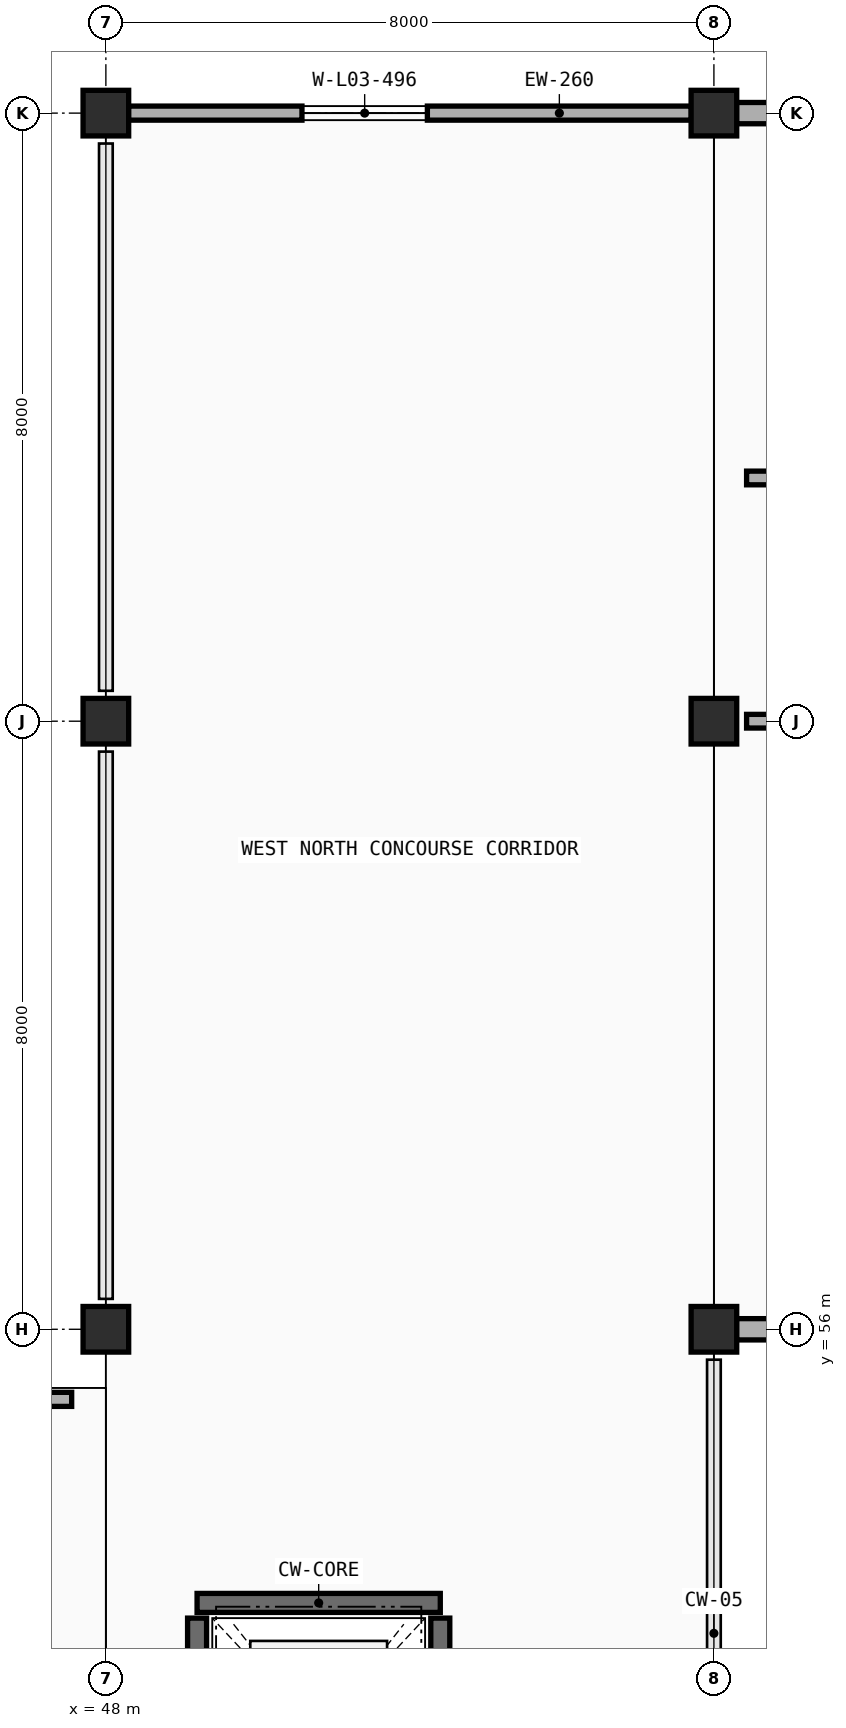
"""IFC4 building model, lengths in metres.
Left out: names, types, materials, properties, quantities, classifications, styles, units other than length and angle.
Written with IfcOpenShell. Run it as: python <this file> out.ifc"""

import sys

from ifc_helpers import new_model, si_unit, direction, frame, frame_2d, origin, origin_2d, place, context, subcontext, project, spatial, rectangle, extrude, element, fill, save


model = new_model("IFC4")
c1 = context("Model", 3, precision=1e-05, world=origin(), true_north=direction((0.0, 1.0)))
c2 = subcontext(c1, "Body", "Model", "MODEL_VIEW")
j1 = project(units=[si_unit("LENGTHUNIT", "METRE"), si_unit("PLANEANGLEUNIT", "RADIAN")], contexts=[c1])
p1 = place(None, origin())
s1 = spatial("IfcSite", under=j1, at=p1, CompositionType="ELEMENT")
p2 = place(p1, origin())
s2 = spatial("IfcBuilding", under=s1, at=p2, CompositionType="ELEMENT")
p3 = place(p2, frame((0.0, 0.0, 9.6)))
s3 = spatial("IfcBuildingStorey", under=s2, at=p3, CompositionType="ELEMENT", Elevation=9.6)
for number, where, z_axis, x_axis in (
    (1, (48.0, 56.0, 0.0), (0.0, 0.0, 1.0), (1.0, 0.0, 0.0)),
    (2, (56.0, 56.0, 0.0), (0.0, 0.0, 1.0), (1.0, 0.0, 0.0)),
    (3, (48.0, 64.0, 0.0), (0.0, 0.0, 1.0), (1.0, 0.0, 0.0)),
    (4, (56.0, 64.0, 0.0), (0.0, 0.0, 1.0), (1.0, 0.0, 0.0)),
    (5, (48.0, 72.0, 0.0), (0.0, 0.0, 1.0), (1.0, 0.0, 0.0)),
    (6, (56.0, 72.0, 0.0), (0.0, 0.0, 1.0), (1.0, 0.0, 0.0)),
):
    element("IfcColumn", number, at=place(p3, frame(where, z_axis=z_axis, x_axis=x_axis)), inside=s3, PredefinedType="COLUMN", context=c2, shape_type="SweptSolid", body=[
        extrude(rectangle(XDim=0.6, YDim=0.6, at=origin_2d()), origin(), (0.0, 0.0, 1.0), 4.2),
    ])
p4 = place(p3, frame((63.653, 56.0, 0.0), z_axis=(0.0, 0.0, 1.0), x_axis=(-1.0, 0.0, 0.0)))
e7 = element("IfcWall", 7, at=p4, inside=s3, PredefinedType="STANDARD", context=c2, shape_type="SweptSolid", body=[
    extrude(rectangle(XDim=7.356, YDim=0.28, at=frame_2d((3.678, 0.0))), origin(), (0.0, 0.0, 1.0), 3.325),
])
p5 = place(p4, frame((2.233, 0.0, 0.9)))
e8 = element("IfcOpeningElement", 8, at=p5, cuts=e7, PredefinedType="OPENING", context=c2, shape_type="SweptSolid", body=[
    extrude(rectangle(XDim=1.25, YDim=2.0, at=frame_2d((0.625, 1.0))), frame((0.0, 0.15, 0.0), z_axis=(0.0, -1.0, 0.0), x_axis=(1.0, 0.0, 0.0)), (0.0, 0.0, 1.0), 0.3),
])
p6 = place(p3, frame((56.297, 72.0, 0.0), z_axis=(0.0, 0.0, 1.0), x_axis=(1.0, 0.0, 0.0)))
e9 = element("IfcWall", 9, at=p6, inside=s3, PredefinedType="STANDARD", context=c2, shape_type="SweptSolid", body=[
    extrude(rectangle(XDim=7.356, YDim=0.28, at=frame_2d((3.678, 0.0))), origin(), (0.0, 0.0, 1.0), 3.325),
])
p7 = place(p6, frame((2.283, 0.0, 0.9)))
e10 = element("IfcOpeningElement", 10, at=p7, cuts=e9, PredefinedType="OPENING", context=c2, shape_type="SweptSolid", body=[
    extrude(rectangle(XDim=1.25, YDim=2.0, at=frame_2d((0.625, 1.0))), frame((0.0, 0.15, 0.0), z_axis=(0.0, -1.0, 0.0), x_axis=(1.0, 0.0, 0.0)), (0.0, 0.0, 1.0), 0.3),
])
p8 = place(p3, frame((48.297, 72.0, 0.0), z_axis=(0.0, 0.0, 1.0), x_axis=(1.0, 0.0, 0.0)))
e11 = element("IfcWall", 11, at=p8, inside=s3, PredefinedType="STANDARD", context=c2, shape_type="SweptSolid", body=[
    extrude(rectangle(XDim=7.406, YDim=0.185, at=frame_2d((3.703, 0.0))), origin(), (0.0, 0.0, 1.0), 3.325),
])
p9 = place(p8, frame((2.283, 0.0, 0.9)))
e12 = element("IfcOpeningElement", 12, at=p9, cuts=e11, PredefinedType="OPENING", context=c2, shape_type="SweptSolid", body=[
    extrude(rectangle(XDim=1.65, YDim=1.85, at=frame_2d((0.825, 0.925))), frame((0.0, 0.103, 0.0), z_axis=(0.0, -1.0, 0.0), x_axis=(1.0, 0.0, 0.0)), (0.0, 0.0, 1.0), 0.205),
])
p10 = place(p3, frame((42.322, 55.078, 0.0), z_axis=(0.0, 0.0, 1.0), x_axis=(1.0, 0.0, 0.0)))
e13 = element("IfcWall", 13, at=p10, inside=s3, PredefinedType="STANDARD", context=c2, shape_type="SweptSolid", body=[
    extrude(rectangle(XDim=5.228, YDim=0.185, at=frame_2d((2.614, 0.0))), origin(), (0.0, 0.0, 1.0), 3.325),
])
p11 = place(p10, frame((1.928, 0.0, 0.9)))
e14 = element("IfcOpeningElement", 14, at=p11, cuts=e13, PredefinedType="OPENING", context=c2, shape_type="SweptSolid", body=[
    extrude(rectangle(XDim=1.25, YDim=1.25, at=frame_2d((0.625, 0.625))), frame((0.0, 0.103, 0.0), z_axis=(0.0, -1.0, 0.0), x_axis=(1.0, 0.0, 0.0)), (0.0, 0.0, 1.0), 0.205),
])
p12 = place(p3, frame((48.1, 79.78, 0.0), z_axis=(0.0, 0.0, 1.0), x_axis=(0.0, -1.0, 0.0)))
e15 = element("IfcWall", 15, at=p12, inside=s3, PredefinedType="PARAPET", context=c2, shape_type="SweptSolid", body=[
    extrude(rectangle(XDim=7.56, YDim=0.18, at=frame_2d((3.78, 0.0))), origin(), (0.0, 0.0, 1.0), 1.15),
])
p13 = place(p3, frame((49.2, 52.4, 0.0), z_axis=(0.0, 0.0, 1.0), x_axis=(1.0, 0.0, 0.0)))
e16 = element("IfcWall", 16, at=p13, inside=s3, PredefinedType="SOLIDWALL", context=c2, shape_type="SweptSolid", body=[
    extrude(rectangle(XDim=3.2, YDim=0.25, at=frame_2d((1.6, 0.0))), origin(), (0.0, 0.0, 1.0), 4.2),
])
for number, where, z_axis, x_axis in (
    (17, (49.2, 49.2, 0.0), (0.0, 0.0, 1.0), (0.0, 1.0, 0.0)),
    (18, (52.4, 49.2, 0.0), (0.0, 0.0, 1.0), (0.0, 1.0, 0.0)),
):
    element("IfcWall", number, at=place(p3, frame(where, z_axis=z_axis, x_axis=x_axis)), inside=s3, PredefinedType="SOLIDWALL", context=c2, shape_type="SweptSolid", body=[
        extrude(rectangle(XDim=3.0, YDim=0.25, at=frame_2d((1.5, 0.0))), origin(), (0.0, 0.0, 1.0), 4.2),
    ])
p14 = place(p3, frame((56.43, 64.0, 0.0), z_axis=(0.0, 0.0, 1.0), x_axis=(1.0, 0.0, 0.0)))
e19 = element("IfcWall", 19, at=p14, inside=s3, PredefinedType="PARTITIONING", context=c2, shape_type="SweptSolid", body=[
    extrude(rectangle(XDim=23.14, YDim=0.18, at=frame_2d((11.57, 0.0))), origin(), (0.0, 0.0, 1.0), 3.275),
])
p15 = place(p14, frame((2.96, 0.0, 0.0)))
e20 = element("IfcOpeningElement", 20, at=p15, cuts=e19, PredefinedType="OPENING", context=c2, shape_type="SweptSolid", body=[
    extrude(rectangle(XDim=1.22, YDim=2.18, at=frame_2d((0.61, 1.09))), frame((0.0, 0.1, 0.0), z_axis=(0.0, -1.0, 0.0), x_axis=(1.0, 0.0, 0.0)), (0.0, 0.0, 1.0), 0.2),
])
p16 = place(p3, frame((56.43, 67.2, 0.0), z_axis=(0.0, 0.0, 1.0), x_axis=(1.0, 0.0, 0.0)))
e21 = element("IfcWall", 21, at=p16, inside=s3, PredefinedType="PARTITIONING", context=c2, shape_type="SweptSolid", body=[
    extrude(rectangle(XDim=15.14, YDim=0.18, at=frame_2d((7.57, 0.0))), origin(), (0.0, 0.0, 1.0), 3.3),
])
p17 = place(p16, frame((3.0, 0.0, 0.0)))
e22 = element("IfcOpeningElement", 22, at=p17, cuts=e21, PredefinedType="OPENING", context=c2, shape_type="SweptSolid", body=[
    extrude(rectangle(XDim=1.14, YDim=2.15, at=frame_2d((0.57, 1.075))), frame((0.0, 0.1, 0.0), z_axis=(0.0, -1.0, 0.0), x_axis=(1.0, 0.0, 0.0)), (0.0, 0.0, 1.0), 0.2),
])
p18 = place(p9, origin())
e23 = element("IfcWindow", 23, at=p18, inside=s3, PartitioningType="DOUBLE_PANEL_VERTICAL", PredefinedType="WINDOW", context=c2, shape_type="SweptSolid", body=[
    extrude(rectangle(XDim=1.65, YDim=1.85, at=frame_2d((0.825, 0.925))), frame((0.0, 0.03, 0.0), z_axis=(0.0, -1.0, 0.0), x_axis=(1.0, 0.0, 0.0)), (0.0, 0.0, 1.0), 0.06),
])
fill(e12, e23)
save(model, sys.argv[1])
